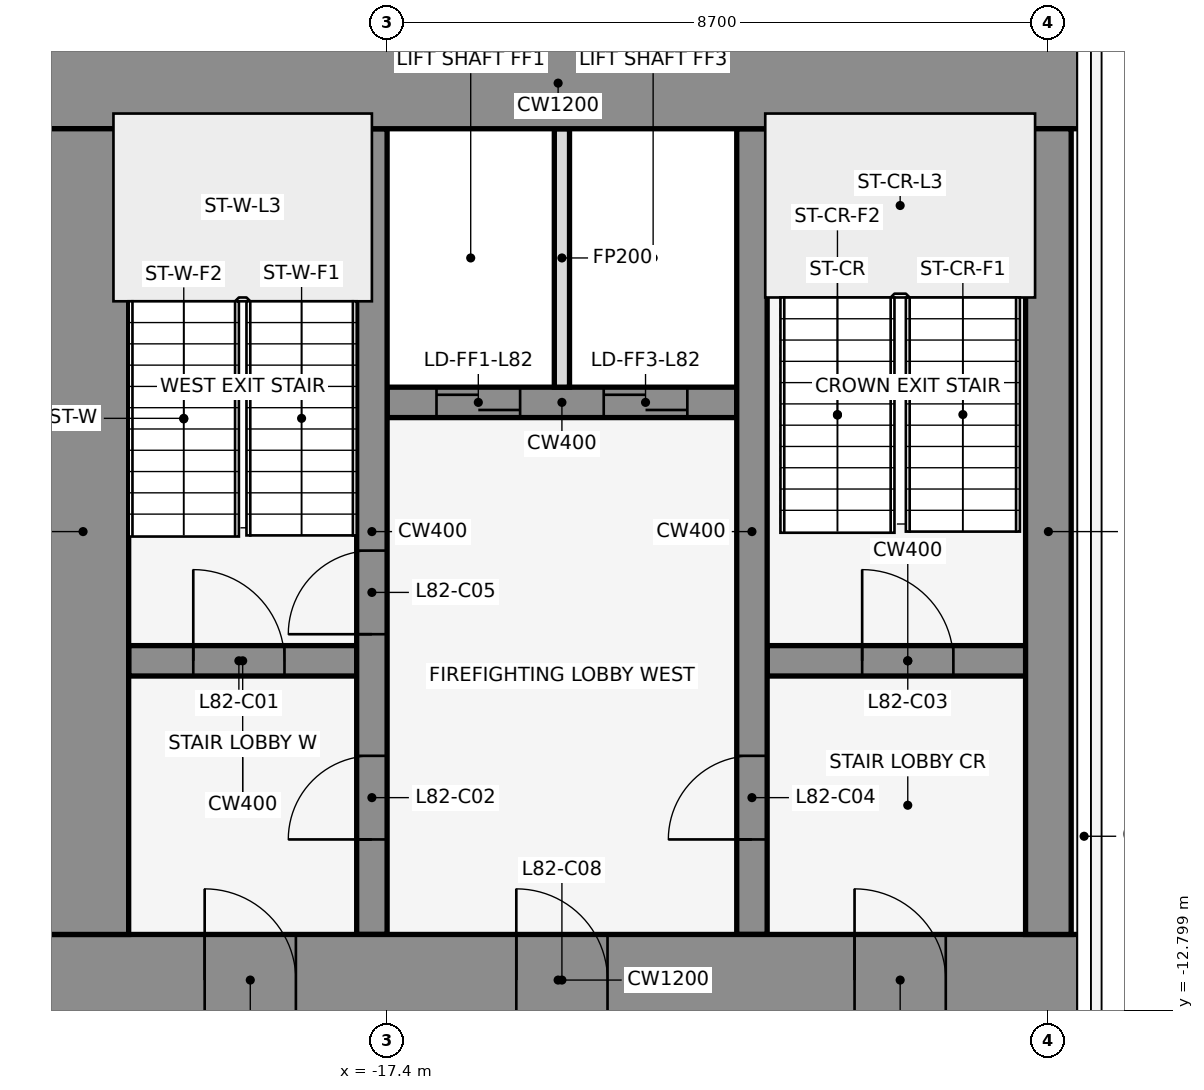
"""IFC4 building model, lengths in metres.
Left out: names, types, materials, properties, quantities, classifications, styles, units other than length and angle.
Written with IfcOpenShell. Run it as: python <this file> out.ifc"""

import sys

from ifc_helpers import new_model, si_unit, direction, frame, frame_2d, origin, place, context, subcontext, project, spatial, rectangle, extrude, element, fill, save


model = new_model("IFC4")
c1 = context("Model", 3, precision=1e-05, world=origin(), true_north=direction((0.0, 1.0)))
c2 = subcontext(c1, "Body", "Model", "MODEL_VIEW")
j1 = project(units=[si_unit("LENGTHUNIT", "METRE"), si_unit("PLANEANGLEUNIT", "RADIAN")], contexts=[c1])
p1 = place(None, origin())
s1 = spatial("IfcSite", under=j1, at=p1, CompositionType="ELEMENT")
p2 = place(p1, origin())
s2 = spatial("IfcBuilding", under=s1, at=p2, CompositionType="ELEMENT")
p3 = place(p2, frame((0.0, 0.0, 365.9)))
s3 = spatial("IfcBuildingStorey", under=s2, at=p3, CompositionType="ELEMENT", Elevation=365.9)
p4 = place(p3, frame((-20.8, -8.2, 0.0), z_axis=(0.0, 0.0, 1.0), x_axis=(1.0, 0.0, 0.0)))
e1 = element("IfcWall", 1, at=p4, inside=s3, PredefinedType="SHEAR", context=c2, shape_type="SweptSolid", body=[
    extrude(rectangle(XDim=3.0, YDim=0.4, at=frame_2d((1.5, 0.0))), origin(), (0.0, 0.0, 1.0), 4.5),
])
p5 = place(p4, frame((0.85, 0.0, 0.0)))
e2 = element("IfcOpeningElement", 2, at=p5, cuts=e1, PredefinedType="OPENING", context=c2, shape_type="SweptSolid", body=[
    extrude(rectangle(XDim=1.2, YDim=2.1, at=frame_2d((0.6, 1.05))), frame((0.0, 0.212, 0.0), z_axis=(0.0, -1.0, 0.0), x_axis=(1.0, 0.0, 0.0)), (0.0, 0.0, 1.0), 0.424),
])
p6 = place(p3, frame((-12.4, -8.2, 0.0), z_axis=(0.0, 0.0, 1.0), x_axis=(1.0, 0.0, 0.0)))
e3 = element("IfcWall", 3, at=p6, inside=s3, PredefinedType="SHEAR", context=c2, shape_type="SweptSolid", body=[
    extrude(rectangle(XDim=3.7, YDim=0.4, at=frame_2d((1.85, 0.0))), origin(), (0.0, 0.0, 1.0), 4.5),
])
p7 = place(p6, frame((1.25, 0.0, 0.0)))
e4 = element("IfcOpeningElement", 4, at=p7, cuts=e3, PredefinedType="OPENING", context=c2, shape_type="SweptSolid", body=[
    extrude(rectangle(XDim=1.2, YDim=2.1, at=frame_2d((0.6, 1.05))), frame((0.0, 0.212, 0.0), z_axis=(0.0, -1.0, 0.0), x_axis=(1.0, 0.0, 0.0)), (0.0, 0.0, 1.0), 0.424),
])
p8 = place(p3, frame((-17.4, -4.8, 0.0), z_axis=(0.0, 0.0, 1.0), x_axis=(1.0, 0.0, 0.0)))
e5 = element("IfcWall", 5, at=p8, inside=s3, PredefinedType="SHEAR", context=c2, shape_type="SweptSolid", body=[
    extrude(rectangle(XDim=4.6, YDim=0.4, at=frame_2d((2.3, 0.0))), origin(), (0.0, 0.0, 1.0), 4.5),
])
p9 = place(p8, frame((0.65, 0.0, 0.0)))
e6 = element("IfcOpeningElement", 6, at=p9, cuts=e5, PredefinedType="OPENING", context=c2, shape_type="SweptSolid", body=[
    extrude(rectangle(XDim=1.1, YDim=2.1, at=frame_2d((0.55, 1.05))), frame((0.0, 0.212, 0.0), z_axis=(0.0, -1.0, 0.0), x_axis=(1.0, 0.0, 0.0)), (0.0, 0.0, 1.0), 0.424),
])
p10 = place(p8, frame((2.85, 0.0, 0.0)))
e7 = element("IfcOpeningElement", 7, at=p10, cuts=e5, PredefinedType="OPENING", context=c2, shape_type="SweptSolid", body=[
    extrude(rectangle(XDim=1.1, YDim=2.1, at=frame_2d((0.55, 1.05))), frame((0.0, 0.212, 0.0), z_axis=(0.0, -1.0, 0.0), x_axis=(1.0, 0.0, 0.0)), (0.0, 0.0, 1.0), 0.424),
])
p11 = place(p3, frame((-17.6, -11.8, 0.0), z_axis=(0.0, 0.0, 1.0), x_axis=(0.0, 1.0, 0.0)))
e8 = element("IfcWall", 8, at=p11, inside=s3, PredefinedType="SHEAR", context=c2, shape_type="SweptSolid", body=[
    extrude(rectangle(XDim=10.6, YDim=0.4, at=frame_2d((5.3, 0.0))), origin(), (0.0, 0.0, 1.0), 4.5),
])
p12 = place(p11, frame((1.25, 0.0, 0.0)))
e9 = element("IfcOpeningElement", 9, at=p12, cuts=e8, PredefinedType="OPENING", context=c2, shape_type="SweptSolid", body=[
    extrude(rectangle(XDim=1.1, YDim=2.1, at=frame_2d((0.55, 1.05))), frame((0.0, 0.212, 0.0), z_axis=(0.0, -1.0, 0.0), x_axis=(1.0, 0.0, 0.0)), (0.0, 0.0, 1.0), 0.424),
])
p13 = place(p11, frame((3.95, 0.0, 0.0)))
e10 = element("IfcOpeningElement", 10, at=p13, cuts=e8, PredefinedType="OPENING", context=c2, shape_type="SweptSolid", body=[
    extrude(rectangle(XDim=1.1, YDim=2.1, at=frame_2d((0.55, 1.05))), frame((0.0, 0.212, 0.0), z_axis=(0.0, -1.0, 0.0), x_axis=(1.0, 0.0, 0.0)), (0.0, 0.0, 1.0), 0.424),
])
p14 = place(p3, frame((-15.1, -4.6, 0.0), z_axis=(0.0, 0.0, 1.0), x_axis=(0.0, 1.0, 0.0)))
e11 = element("IfcWall", 11, at=p14, inside=s3, PredefinedType="PARTITIONING", context=c2, shape_type="SweptSolid", body=[
    extrude(rectangle(XDim=3.4, YDim=0.2, at=frame_2d((1.7, 0.0))), origin(), (0.0, 0.0, 1.0), 3.368),
])
p15 = place(p3, frame((-12.6, -11.8, 0.0), z_axis=(0.0, 0.0, 1.0), x_axis=(0.0, 1.0, 0.0)))
e12 = element("IfcWall", 12, at=p15, inside=s3, PredefinedType="SHEAR", context=c2, shape_type="SweptSolid", body=[
    extrude(rectangle(XDim=10.6, YDim=0.4, at=frame_2d((5.3, 0.0))), origin(), (0.0, 0.0, 1.0), 4.5),
])
p16 = place(p15, frame((1.25, 0.0, 0.0)))
e13 = element("IfcOpeningElement", 13, at=p16, cuts=e12, PredefinedType="OPENING", context=c2, shape_type="SweptSolid", body=[
    extrude(rectangle(XDim=1.1, YDim=2.1, at=frame_2d((0.55, 1.05))), frame((0.0, 0.212, 0.0), z_axis=(0.0, -1.0, 0.0), x_axis=(1.0, 0.0, 0.0)), (0.0, 0.0, 1.0), 0.424),
])
p17 = place(p3, frame((-22.0, -0.6, 0.0), z_axis=(0.0, 0.0, 1.0), x_axis=(1.0, 0.0, 0.0)))
e14 = element("IfcWall", 14, at=p17, inside=s3, PredefinedType="SHEAR", context=c2, shape_type="SweptSolid", body=[
    extrude(rectangle(XDim=13.7, YDim=1.2, at=frame_2d((6.85, 0.0))), origin(), (0.0, 0.0, 1.0), 4.5),
])
p18 = place(p3, frame((-22.0, -12.4, 0.0), z_axis=(0.0, 0.0, 1.0), x_axis=(1.0, 0.0, 0.0)))
e15 = element("IfcWall", 15, at=p18, inside=s3, PredefinedType="SHEAR", context=c2, shape_type="SweptSolid", body=[
    extrude(rectangle(XDim=13.7, YDim=1.2, at=frame_2d((6.85, 0.0))), origin(), (0.0, 0.0, 1.0), 4.5),
])
p19 = place(p18, frame((2.2, 0.0, 0.0)))
e16 = element("IfcOpeningElement", 16, at=p19, cuts=e15, PredefinedType="OPENING", context=c2, shape_type="SweptSolid", body=[
    extrude(rectangle(XDim=1.2, YDim=2.1, at=frame_2d((0.6, 1.05))), frame((0.0, 0.612, 0.0), z_axis=(0.0, -1.0, 0.0), x_axis=(1.0, 0.0, 0.0)), (0.0, 0.0, 1.0), 1.224),
])
p20 = place(p18, frame((10.75, 0.0, 0.0)))
e17 = element("IfcOpeningElement", 17, at=p20, cuts=e15, PredefinedType="OPENING", context=c2, shape_type="SweptSolid", body=[
    extrude(rectangle(XDim=1.2, YDim=2.1, at=frame_2d((0.6, 1.05))), frame((0.0, 0.612, 0.0), z_axis=(0.0, -1.0, 0.0), x_axis=(1.0, 0.0, 0.0)), (0.0, 0.0, 1.0), 1.224),
])
p21 = place(p18, frame((6.3, 0.0, 0.0)))
e18 = element("IfcOpeningElement", 18, at=p21, cuts=e15, PredefinedType="OPENING", context=c2, shape_type="SweptSolid", body=[
    extrude(rectangle(XDim=1.2, YDim=2.1, at=frame_2d((0.6, 1.05))), frame((0.0, 0.612, 0.0), z_axis=(0.0, -1.0, 0.0), x_axis=(1.0, 0.0, 0.0)), (0.0, 0.0, 1.0), 1.224),
])
p22 = place(p3, frame((-21.4, -11.8, 0.0), z_axis=(0.0, 0.0, 1.0), x_axis=(0.0, 1.0, 0.0)))
e19 = element("IfcWall", 19, at=p22, inside=s3, PredefinedType="SHEAR", context=c2, shape_type="SweptSolid", body=[
    extrude(rectangle(XDim=10.6, YDim=1.2, at=frame_2d((5.3, 0.0))), origin(), (0.0, 0.0, 1.0), 4.5),
])
p23 = place(p3, frame((-8.7, -11.8, 0.0), z_axis=(0.0, 0.0, 1.0), x_axis=(0.0, 1.0, 0.0)))
e20 = element("IfcWall", 20, at=p23, inside=s3, PredefinedType="SHEAR", context=c2, shape_type="SweptSolid", body=[
    extrude(rectangle(XDim=10.6, YDim=0.6, at=frame_2d((5.3, 0.0))), origin(), (0.0, 0.0, 1.0), 4.5),
])
p24 = place(p5, origin())
e21 = element("IfcDoor", 21, at=p24, inside=s3, OperationType="SINGLE_SWING_LEFT", PredefinedType="DOOR", context=c2, shape_type="SweptSolid", body=[
    extrude(rectangle(XDim=1.2, YDim=2.1, at=frame_2d((0.6, 1.05))), frame((0.0, 0.025, 0.0), z_axis=(0.0, -1.0, 0.0), x_axis=(1.0, 0.0, 0.0)), (0.0, 0.0, 1.0), 0.05),
])
fill(e2, e21)
p25 = place(p12, frame((1.1, 0.0, 0.0), z_axis=(0.0, 0.0, 1.0), x_axis=(-1.0, 0.0, 0.0)))
e22 = element("IfcDoor", 22, at=p25, inside=s3, OperationType="SINGLE_SWING_LEFT", PredefinedType="DOOR", context=c2, shape_type="SweptSolid", body=[
    extrude(rectangle(XDim=1.1, YDim=2.1, at=frame_2d((0.55, 1.05))), frame((0.0, 0.025, 0.0), z_axis=(0.0, -1.0, 0.0), x_axis=(1.0, 0.0, 0.0)), (0.0, 0.0, 1.0), 0.05),
])
fill(e9, e22)
p26 = place(p7, origin())
e23 = element("IfcDoor", 23, at=p26, inside=s3, OperationType="SINGLE_SWING_LEFT", PredefinedType="DOOR", context=c2, shape_type="SweptSolid", body=[
    extrude(rectangle(XDim=1.2, YDim=2.1, at=frame_2d((0.6, 1.05))), frame((0.0, 0.025, 0.0), z_axis=(0.0, -1.0, 0.0), x_axis=(1.0, 0.0, 0.0)), (0.0, 0.0, 1.0), 0.05),
])
fill(e4, e23)
p27 = place(p16, origin())
e24 = element("IfcDoor", 24, at=p27, inside=s3, OperationType="SINGLE_SWING_RIGHT", PredefinedType="DOOR", context=c2, shape_type="SweptSolid", body=[
    extrude(rectangle(XDim=1.1, YDim=2.1, at=frame_2d((0.55, 1.05))), frame((0.0, 0.025, 0.0), z_axis=(0.0, -1.0, 0.0), x_axis=(1.0, 0.0, 0.0)), (0.0, 0.0, 1.0), 0.05),
])
fill(e13, e24)
p28 = place(p9, origin())
e25 = element("IfcDoor", 25, at=p28, inside=s3, OperationType="DOUBLE_DOOR_SLIDING", PredefinedType="DOOR", context=c2, shape_type="SweptSolid", body=[
    extrude(rectangle(XDim=1.1, YDim=2.1, at=frame_2d((0.55, 1.05))), frame((0.0, 0.025, 0.0), z_axis=(0.0, -1.0, 0.0), x_axis=(1.0, 0.0, 0.0)), (0.0, 0.0, 1.0), 0.05),
])
fill(e6, e25)
p29 = place(p10, origin())
e26 = element("IfcDoor", 26, at=p29, inside=s3, OperationType="DOUBLE_DOOR_SLIDING", PredefinedType="DOOR", context=c2, shape_type="SweptSolid", body=[
    extrude(rectangle(XDim=1.1, YDim=2.1, at=frame_2d((0.55, 1.05))), frame((0.0, 0.025, 0.0), z_axis=(0.0, -1.0, 0.0), x_axis=(1.0, 0.0, 0.0)), (0.0, 0.0, 1.0), 0.05),
])
fill(e7, e26)
p30 = place(p13, frame((1.1, 0.0, 0.0), z_axis=(0.0, 0.0, 1.0), x_axis=(-1.0, 0.0, 0.0)))
e27 = element("IfcDoor", 27, at=p30, inside=s3, OperationType="SINGLE_SWING_RIGHT", PredefinedType="DOOR", context=c2, shape_type="SweptSolid", body=[
    extrude(rectangle(XDim=1.1, YDim=2.1, at=frame_2d((0.55, 1.05))), frame((0.0, 0.025, 0.0), z_axis=(0.0, -1.0, 0.0), x_axis=(1.0, 0.0, 0.0)), (0.0, 0.0, 1.0), 0.05),
])
fill(e10, e27)
p31 = place(p19, frame((1.2, 0.0, 0.0), z_axis=(0.0, 0.0, 1.0), x_axis=(-1.0, 0.0, 0.0)))
e28 = element("IfcDoor", 28, at=p31, inside=s3, OperationType="SINGLE_SWING_RIGHT", PredefinedType="DOOR", context=c2, shape_type="SweptSolid", body=[
    extrude(rectangle(XDim=1.2, YDim=2.1, at=frame_2d((0.6, 1.05))), frame((0.0, 0.025, 0.0), z_axis=(0.0, -1.0, 0.0), x_axis=(1.0, 0.0, 0.0)), (0.0, 0.0, 1.0), 0.05),
])
fill(e16, e28)
p32 = place(p20, frame((1.2, 0.0, 0.0), z_axis=(0.0, 0.0, 1.0), x_axis=(-1.0, 0.0, 0.0)))
e29 = element("IfcDoor", 29, at=p32, inside=s3, OperationType="SINGLE_SWING_RIGHT", PredefinedType="DOOR", context=c2, shape_type="SweptSolid", body=[
    extrude(rectangle(XDim=1.2, YDim=2.1, at=frame_2d((0.6, 1.05))), frame((0.0, 0.025, 0.0), z_axis=(0.0, -1.0, 0.0), x_axis=(1.0, 0.0, 0.0)), (0.0, 0.0, 1.0), 0.05),
])
fill(e17, e29)
p33 = place(p21, frame((1.2, 0.0, 0.0), z_axis=(0.0, 0.0, 1.0), x_axis=(-1.0, 0.0, 0.0)))
e30 = element("IfcDoor", 30, at=p33, inside=s3, OperationType="SINGLE_SWING_RIGHT", PredefinedType="DOOR", context=c2, shape_type="SweptSolid", body=[
    extrude(rectangle(XDim=1.2, YDim=2.1, at=frame_2d((0.6, 1.05))), frame((0.0, 0.025, 0.0), z_axis=(0.0, -1.0, 0.0), x_axis=(1.0, 0.0, 0.0)), (0.0, 0.0, 1.0), 0.05),
])
fill(e18, e30)
save(model, sys.argv[1])
